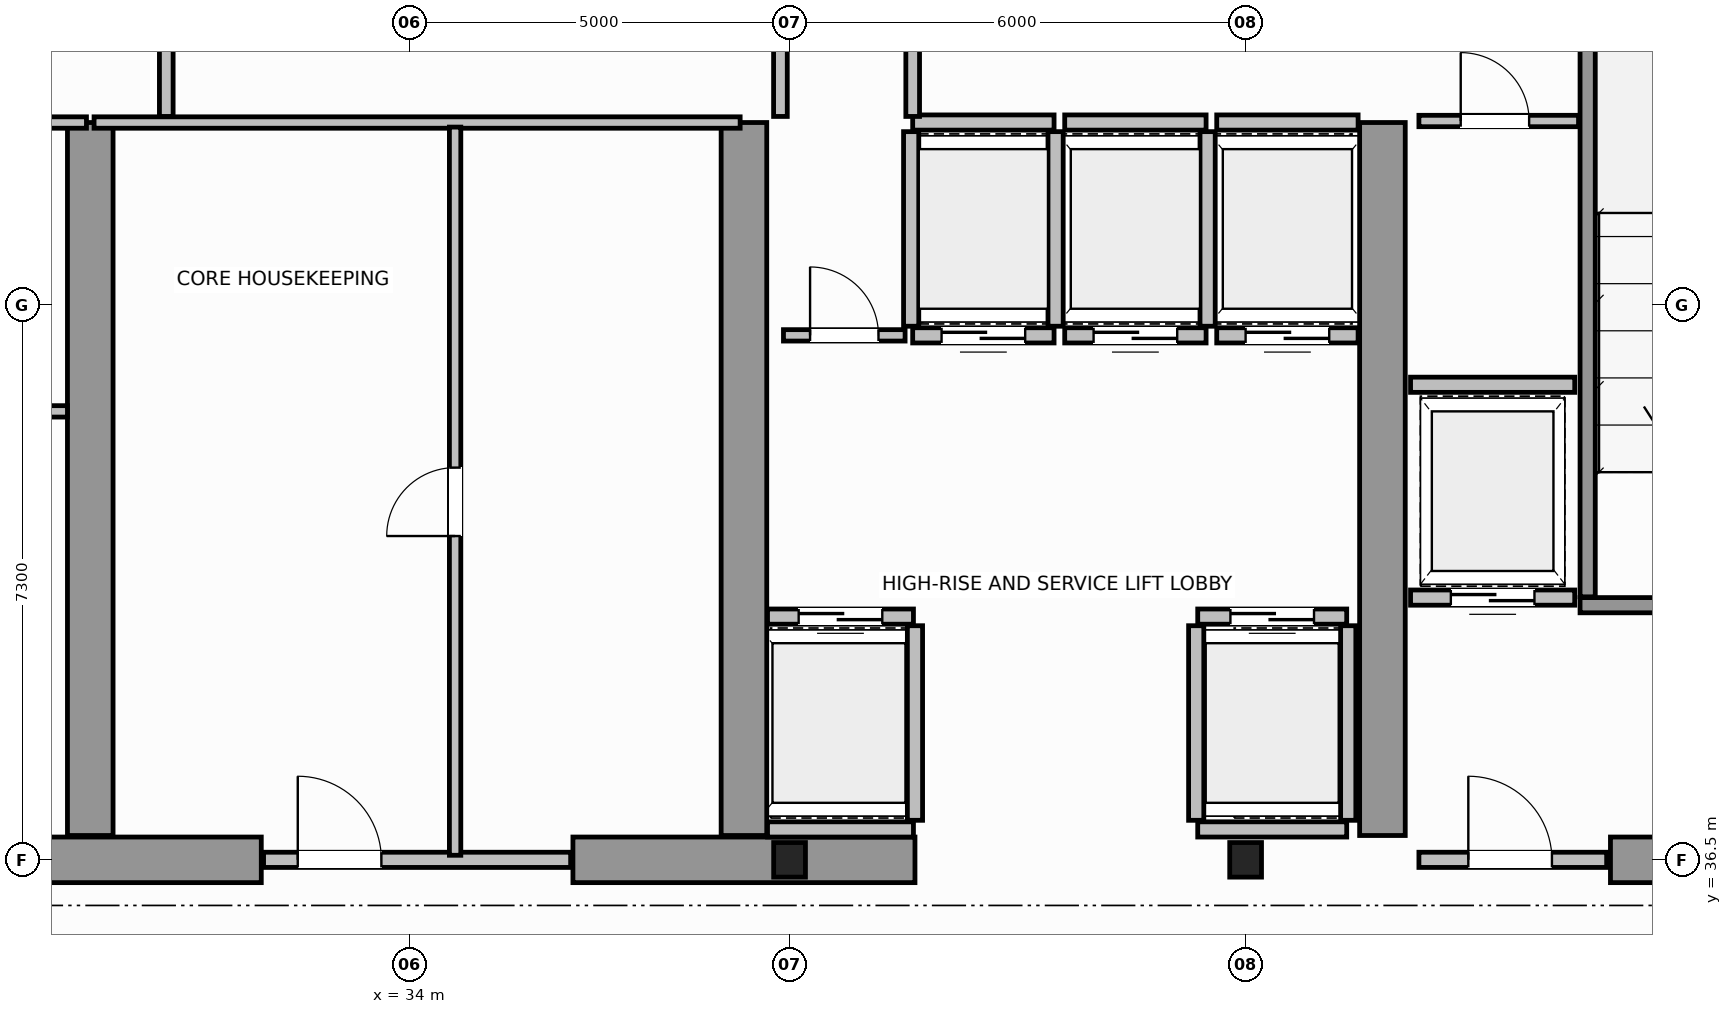
"""IFC4 building model, lengths in metres.
Left out: names, types, materials, properties, quantities, classifications, styles, units other than length and angle.
Written with IfcOpenShell. Run it as: python <this file> out.ifc"""

import sys

from ifc_helpers import new_model, si_unit, direction, frame, frame_2d, origin, origin_2d, place, context, subcontext, project, spatial, rectangle, i_section, extrude, source, transform, mapped, element, fill, save


model = new_model("IFC4")
c1 = context("Model", 3, precision=1e-05, world=origin(), true_north=direction((0.0, 1.0)))
c2 = subcontext(c1, "Body", "Model", "MODEL_VIEW")
j1 = project(units=[si_unit("LENGTHUNIT", "METRE"), si_unit("PLANEANGLEUNIT", "RADIAN")], contexts=[c1])
p1 = place(None, origin())
s1 = spatial("IfcSite", under=j1, at=p1, CompositionType="ELEMENT")
p2 = place(p1, origin())
s2 = spatial("IfcBuilding", under=s1, at=p2, CompositionType="ELEMENT")
p3 = place(p2, frame((0.0, 0.0, 230.8)))
s3 = spatial("IfcBuildingStorey", under=s2, at=p3, CompositionType="ELEMENT", Elevation=230.8)
m1 = source(origin(), c2, "Body", "SweptSolid", [
    extrude(i_section(OverallWidth=0.418, OverallDepth=0.455, WebThickness=0.042, FlangeThickness=0.058, FilletRadius=0.015, at=origin_2d()), origin(), (0.0, 0.0, 1.0), 3.8),
])
for number, where, z_axis, x_axis in (
    (1, (39.0, 36.5, 0.0), (0.0, 0.0, 1.0), (1.0, 0.0, 0.0)),
    (2, (45.0, 36.5, 0.0), (0.0, 0.0, 1.0), (1.0, 0.0, 0.0)),
):
    element("IfcColumn", number, at=place(p3, frame(where, z_axis=z_axis, x_axis=x_axis)), inside=s3, PredefinedType="COLUMN", context=c2, shape_type="MappedRepresentation", body=[
        mapped(m1, transform((0.0, 0.0, 0.0), scale=1.0)),
    ])
for number, where, z_axis, x_axis in (
    (3, (27.55, 36.5, 0.0), (0.0, 0.0, 1.0), (1.0, 0.0, 0.0)),
    (4, (36.15, 36.5, 0.0), (0.0, 0.0, 1.0), (1.0, 0.0, 0.0)),
):
    element("IfcWall", number, at=place(p3, frame(where, z_axis=z_axis, x_axis=x_axis)), inside=s3, PredefinedType="SHEAR", context=c2, shape_type="SweptSolid", body=[
        extrude(rectangle(XDim=4.5, YDim=0.6, at=frame_2d((2.25, 0.0))), origin(), (0.0, 0.0, 1.0), 3.8),
    ])
p4 = place(p3, frame((49.8, 36.5, 0.0), z_axis=(0.0, 0.0, 1.0), x_axis=(1.0, 0.0, 0.0)))
e5 = element("IfcWall", 5, at=p4, inside=s3, PredefinedType="SHEAR", context=c2, shape_type="SweptSolid", body=[
    extrude(rectangle(XDim=3.88, YDim=0.6, at=frame_2d((1.94, 0.0))), origin(), (0.0, 0.0, 1.0), 2.58),
])
for number, where, z_axis, x_axis in (
    (6, (29.8, 36.82, 0.0), (0.0, 0.0, 1.0), (0.0, 1.0, 0.0)),
    (7, (38.4, 36.82, 0.0), (0.0, 0.0, 1.0), (0.0, 1.0, 0.0)),
    (8, (46.8, 36.82, 0.0), (0.0, 0.0, 1.0), (0.0, 1.0, 0.0)),
):
    element("IfcWall", number, at=place(p3, frame(where, z_axis=z_axis, x_axis=x_axis)), inside=s3, PredefinedType="SHEAR", context=c2, shape_type="SweptSolid", body=[
        extrude(rectangle(XDim=9.38, YDim=0.6, at=frame_2d((4.69, 0.0))), origin(), (0.0, 0.0, 1.0), 3.8),
    ])
p5 = place(p3, frame((49.4, 39.85, 0.0), z_axis=(0.0, 0.0, 1.0), x_axis=(1.0, 0.0, 0.0)))
e9 = element("IfcWall", 9, at=p5, inside=s3, PredefinedType="SOLIDWALL", context=c2, shape_type="SweptSolid", body=[
    extrude(rectangle(XDim=4.3, YDim=0.2, at=frame_2d((2.15, 0.0))), origin(), (0.0, 0.0, 1.0), 3.8),
])
p6 = place(p5, frame((1.325, 0.0, 0.0)))
e10 = element("IfcOpeningElement", 10, at=p6, cuts=e9, PredefinedType="OPENING", context=c2, shape_type="SweptSolid", body=[
    extrude(rectangle(XDim=1.1, YDim=2.15, at=frame_2d((0.55, 1.075))), frame((0.0, 0.11, 0.0), z_axis=(0.0, -1.0, 0.0), x_axis=(1.0, 0.0, 0.0)), (0.0, 0.0, 1.0), 0.22),
])
p7 = place(p3, frame((49.5, 39.96, 0.0), z_axis=(0.0, 0.0, 1.0), x_axis=(0.0, 1.0, 0.0)))
e11 = element("IfcWall", 11, at=p7, inside=s3, PredefinedType="SOLIDWALL", context=c2, shape_type="SweptSolid", body=[
    extrude(rectangle(XDim=9.93, YDim=0.2, at=frame_2d((4.965, 0.0))), origin(), (0.0, 0.0, 1.0), 3.8),
])
p8 = place(p3, frame((47.28, 36.5, 0.0), z_axis=(0.0, 0.0, 1.0), x_axis=(1.0, 0.0, 0.0)))
e12 = element("IfcWall", 12, at=p8, inside=s3, PredefinedType="SOLIDWALL", context=c2, shape_type="SweptSolid", body=[
    extrude(rectangle(XDim=2.47, YDim=0.2, at=frame_2d((1.235, 0.0))), origin(), (0.0, 0.0, 1.0), 2.57),
])
p9 = place(p8, frame((0.65, 0.0, 0.0)))
e13 = element("IfcOpeningElement", 13, at=p9, cuts=e12, PredefinedType="OPENING", context=c2, shape_type="SweptSolid", body=[
    extrude(rectangle(XDim=1.1, YDim=2.15, at=frame_2d((0.55, 1.075))), frame((0.0, 0.11, 0.0), z_axis=(0.0, -1.0, 0.0), x_axis=(1.0, 0.0, 0.0)), (0.0, 0.0, 1.0), 0.22),
])
p10 = place(p3, frame((38.71, 39.7, 0.0), z_axis=(0.0, 0.0, 1.0), x_axis=(1.0, 0.0, 0.0)))
e14 = element("IfcWall", 14, at=p10, inside=s3, PredefinedType="SOLIDWALL", context=c2, shape_type="SweptSolid", body=[
    extrude(rectangle(XDim=1.92, YDim=0.2, at=frame_2d((0.96, 0.0))), origin(), (0.0, 0.0, 1.0), 3.58),
])
p11 = place(p10, frame((0.41, 0.0, 0.0)))
e15 = element("IfcOpeningElement", 15, at=p11, cuts=e14, PredefinedType="OPENING", context=c2, shape_type="SweptSolid", body=[
    extrude(rectangle(XDim=1.1, YDim=2.15, at=frame_2d((0.55, 1.075))), frame((0.0, 0.11, 0.0), z_axis=(0.0, -1.0, 0.0), x_axis=(1.0, 0.0, 0.0)), (0.0, 0.0, 1.0), 0.22),
])
p12 = place(p3, frame((38.71, 36.9, 0.0), z_axis=(0.0, 0.0, 1.0), x_axis=(1.0, 0.0, 0.0)))
e16 = element("IfcWall", 16, at=p12, inside=s3, PredefinedType="SOLIDWALL", context=c2, shape_type="SweptSolid", body=[
    extrude(rectangle(XDim=1.92, YDim=0.2, at=frame_2d((0.96, 0.0))), origin(), (0.0, 0.0, 1.0), 3.58),
])
p13 = place(p3, frame((40.65, 37.02, 0.0), z_axis=(0.0, 0.0, 1.0), x_axis=(0.0, 1.0, 0.0)))
e17 = element("IfcWall", 17, at=p13, inside=s3, PredefinedType="SOLIDWALL", context=c2, shape_type="SweptSolid", body=[
    extrude(rectangle(XDim=2.56, YDim=0.2, at=frame_2d((1.28, 0.0))), origin(), (0.0, 0.0, 1.0), 3.58),
])
p14 = place(p3, frame((44.37, 39.7, 0.0), z_axis=(0.0, 0.0, 1.0), x_axis=(1.0, 0.0, 0.0)))
e18 = element("IfcWall", 18, at=p14, inside=s3, PredefinedType="SOLIDWALL", context=c2, shape_type="SweptSolid", body=[
    extrude(rectangle(XDim=1.96, YDim=0.2, at=frame_2d((0.98, 0.0))), origin(), (0.0, 0.0, 1.0), 3.58),
])
p15 = place(p14, frame((0.43, 0.0, 0.0)))
e19 = element("IfcOpeningElement", 19, at=p15, cuts=e18, PredefinedType="OPENING", context=c2, shape_type="SweptSolid", body=[
    extrude(rectangle(XDim=1.1, YDim=2.15, at=frame_2d((0.55, 1.075))), frame((0.0, 0.11, 0.0), z_axis=(0.0, -1.0, 0.0), x_axis=(1.0, 0.0, 0.0)), (0.0, 0.0, 1.0), 0.22),
])
p16 = place(p3, frame((44.37, 36.9, 0.0), z_axis=(0.0, 0.0, 1.0), x_axis=(1.0, 0.0, 0.0)))
e20 = element("IfcWall", 20, at=p16, inside=s3, PredefinedType="SOLIDWALL", context=c2, shape_type="SweptSolid", body=[
    extrude(rectangle(XDim=1.96, YDim=0.2, at=frame_2d((0.98, 0.0))), origin(), (0.0, 0.0, 1.0), 2.57),
])
for number, where, z_axis, x_axis in (
    (21, (44.35, 37.02, 0.0), (0.0, 0.0, 1.0), (0.0, 1.0, 0.0)),
    (22, (46.35, 37.02, 0.0), (0.0, 0.0, 1.0), (0.0, 1.0, 0.0)),
):
    element("IfcWall", number, at=place(p3, frame(where, z_axis=z_axis, x_axis=x_axis)), inside=s3, PredefinedType="SOLIDWALL", context=c2, shape_type="SweptSolid", body=[
        extrude(rectangle(XDim=2.56, YDim=0.2, at=frame_2d((1.28, 0.0))), origin(), (0.0, 0.0, 1.0), 3.58),
    ])
p17 = place(p3, frame((40.62, 43.4, 0.0), z_axis=(0.0, 0.0, 1.0), x_axis=(1.0, 0.0, 0.0)))
e23 = element("IfcWall", 23, at=p17, inside=s3, PredefinedType="SOLIDWALL", context=c2, shape_type="SweptSolid", body=[
    extrude(rectangle(XDim=1.86, YDim=0.2, at=frame_2d((0.93, 0.0))), origin(), (0.0, 0.0, 1.0), 3.58),
])
p18 = place(p17, frame((0.38, 0.0, 0.0)))
e24 = element("IfcOpeningElement", 24, at=p18, cuts=e23, PredefinedType="OPENING", context=c2, shape_type="SweptSolid", body=[
    extrude(rectangle(XDim=1.1, YDim=2.15, at=frame_2d((0.55, 1.075))), frame((0.0, 0.11, 0.0), z_axis=(0.0, -1.0, 0.0), x_axis=(1.0, 0.0, 0.0)), (0.0, 0.0, 1.0), 0.22),
])
p19 = place(p3, frame((40.62, 46.2, 0.0), z_axis=(0.0, 0.0, 1.0), x_axis=(1.0, 0.0, 0.0)))
e25 = element("IfcWall", 25, at=p19, inside=s3, PredefinedType="SOLIDWALL", context=c2, shape_type="SweptSolid", body=[
    extrude(rectangle(XDim=1.86, YDim=0.2, at=frame_2d((0.93, 0.0))), origin(), (0.0, 0.0, 1.0), 3.58),
])
for number, where, z_axis, x_axis in (
    (26, (40.6, 43.52, 0.0), (0.0, 0.0, 1.0), (0.0, 1.0, 0.0)),
    (27, (42.5, 43.52, 0.0), (0.0, 0.0, 1.0), (0.0, 1.0, 0.0)),
):
    element("IfcWall", number, at=place(p3, frame(where, z_axis=z_axis, x_axis=x_axis)), inside=s3, PredefinedType="SOLIDWALL", context=c2, shape_type="SweptSolid", body=[
        extrude(rectangle(XDim=2.56, YDim=0.2, at=frame_2d((1.28, 0.0))), origin(), (0.0, 0.0, 1.0), 3.58),
    ])
p20 = place(p3, frame((42.62, 43.4, 0.0), z_axis=(0.0, 0.0, 1.0), x_axis=(1.0, 0.0, 0.0)))
e28 = element("IfcWall", 28, at=p20, inside=s3, PredefinedType="SOLIDWALL", context=c2, shape_type="SweptSolid", body=[
    extrude(rectangle(XDim=1.86, YDim=0.2, at=frame_2d((0.93, 0.0))), origin(), (0.0, 0.0, 1.0), 3.58),
])
p21 = place(p20, frame((0.38, 0.0, 0.0)))
e29 = element("IfcOpeningElement", 29, at=p21, cuts=e28, PredefinedType="OPENING", context=c2, shape_type="SweptSolid", body=[
    extrude(rectangle(XDim=1.1, YDim=2.15, at=frame_2d((0.55, 1.075))), frame((0.0, 0.11, 0.0), z_axis=(0.0, -1.0, 0.0), x_axis=(1.0, 0.0, 0.0)), (0.0, 0.0, 1.0), 0.22),
])
p22 = place(p3, frame((42.62, 46.2, 0.0), z_axis=(0.0, 0.0, 1.0), x_axis=(1.0, 0.0, 0.0)))
e30 = element("IfcWall", 30, at=p22, inside=s3, PredefinedType="SOLIDWALL", context=c2, shape_type="SweptSolid", body=[
    extrude(rectangle(XDim=1.86, YDim=0.2, at=frame_2d((0.93, 0.0))), origin(), (0.0, 0.0, 1.0), 3.58),
])
p23 = place(p3, frame((44.5, 43.52, 0.0), z_axis=(0.0, 0.0, 1.0), x_axis=(0.0, 1.0, 0.0)))
e31 = element("IfcWall", 31, at=p23, inside=s3, PredefinedType="SOLIDWALL", context=c2, shape_type="SweptSolid", body=[
    extrude(rectangle(XDim=2.56, YDim=0.2, at=frame_2d((1.28, 0.0))), origin(), (0.0, 0.0, 1.0), 3.58),
])
p24 = place(p3, frame((44.62, 43.4, 0.0), z_axis=(0.0, 0.0, 1.0), x_axis=(1.0, 0.0, 0.0)))
e32 = element("IfcWall", 32, at=p24, inside=s3, PredefinedType="SOLIDWALL", context=c2, shape_type="SweptSolid", body=[
    extrude(rectangle(XDim=1.86, YDim=0.2, at=frame_2d((0.93, 0.0))), origin(), (0.0, 0.0, 1.0), 3.58),
])
p25 = place(p24, frame((0.38, 0.0, 0.0)))
e33 = element("IfcOpeningElement", 33, at=p25, cuts=e32, PredefinedType="OPENING", context=c2, shape_type="SweptSolid", body=[
    extrude(rectangle(XDim=1.1, YDim=2.15, at=frame_2d((0.55, 1.075))), frame((0.0, 0.11, 0.0), z_axis=(0.0, -1.0, 0.0), x_axis=(1.0, 0.0, 0.0)), (0.0, 0.0, 1.0), 0.22),
])
p26 = place(p3, frame((44.62, 46.2, 0.0), z_axis=(0.0, 0.0, 1.0), x_axis=(1.0, 0.0, 0.0)))
e34 = element("IfcWall", 34, at=p26, inside=s3, PredefinedType="SOLIDWALL", context=c2, shape_type="SweptSolid", body=[
    extrude(rectangle(XDim=1.86, YDim=0.2, at=frame_2d((0.93, 0.0))), origin(), (0.0, 0.0, 1.0), 3.58),
])
p27 = place(p3, frame((47.17, 39.95, 0.0), z_axis=(0.0, 0.0, 1.0), x_axis=(1.0, 0.0, 0.0)))
e35 = element("IfcWall", 35, at=p27, inside=s3, PredefinedType="SOLIDWALL", context=c2, shape_type="SweptSolid", body=[
    extrude(rectangle(XDim=2.16, YDim=0.2, at=frame_2d((1.08, 0.0))), origin(), (0.0, 0.0, 1.0), 3.58),
])
p28 = place(p27, frame((0.53, 0.0, 0.0)))
e36 = element("IfcOpeningElement", 36, at=p28, cuts=e35, PredefinedType="OPENING", context=c2, shape_type="SweptSolid", body=[
    extrude(rectangle(XDim=1.1, YDim=2.15, at=frame_2d((0.55, 1.075))), frame((0.0, 0.11, 0.0), z_axis=(0.0, -1.0, 0.0), x_axis=(1.0, 0.0, 0.0)), (0.0, 0.0, 1.0), 0.22),
])
p29 = place(p3, frame((47.17, 42.75, 0.0), z_axis=(0.0, 0.0, 1.0), x_axis=(1.0, 0.0, 0.0)))
e37 = element("IfcWall", 37, at=p29, inside=s3, PredefinedType="SOLIDWALL", context=c2, shape_type="SweptSolid", body=[
    extrude(rectangle(XDim=2.16, YDim=0.2, at=frame_2d((1.08, 0.0))), origin(), (0.0, 0.0, 1.0), 3.58),
])
p30 = place(p3, frame((21.25, 46.2, 0.0), z_axis=(0.0, 0.0, 1.0), x_axis=(1.0, 0.0, 0.0)))
e38 = element("IfcWall", 38, at=p30, inside=s3, PredefinedType="PARTITIONING", context=c2, shape_type="SweptSolid", body=[
    extrude(rectangle(XDim=8.5, YDim=0.15, at=frame_2d((4.25, 0.0))), origin(), (0.0, 0.0, 1.0), 3.58),
])
p31 = place(p3, frame((21.5, 42.4, 0.0), z_axis=(0.0, 0.0, 1.0), x_axis=(1.0, 0.0, 0.0)))
e39 = element("IfcWall", 39, at=p31, inside=s3, PredefinedType="PARTITIONING", context=c2, shape_type="SweptSolid", body=[
    extrude(rectangle(XDim=8.0, YDim=0.15, at=frame_2d((4.0, 0.0))), origin(), (0.0, 0.0, 1.0), 3.58),
])
p32 = place(p31, frame((3.4, 0.0, 0.0)))
e40 = element("IfcOpeningElement", 40, at=p32, cuts=e39, PredefinedType="OPENING", context=c2, shape_type="SweptSolid", body=[
    extrude(rectangle(XDim=0.9, YDim=2.1, at=frame_2d((0.45, 1.05))), frame((0.0, 0.085, 0.0), z_axis=(0.0, -1.0, 0.0), x_axis=(1.0, 0.0, 0.0)), (0.0, 0.0, 1.0), 0.17),
])
p33 = place(p3, frame((32.08, 36.5, 0.0), z_axis=(0.0, 0.0, 1.0), x_axis=(1.0, 0.0, 0.0)))
e41 = element("IfcWall", 41, at=p33, inside=s3, PredefinedType="SOLIDWALL", context=c2, shape_type="SweptSolid", body=[
    extrude(rectangle(XDim=4.04, YDim=0.2, at=frame_2d((2.02, 0.0))), origin(), (0.0, 0.0, 1.0), 3.02),
])
p34 = place(p33, frame((0.45, 0.0, 0.0)))
e42 = element("IfcOpeningElement", 42, at=p34, cuts=e41, PredefinedType="OPENING", context=c2, shape_type="SweptSolid", body=[
    extrude(rectangle(XDim=1.1, YDim=2.15, at=frame_2d((0.55, 1.075))), frame((0.0, 0.11, 0.0), z_axis=(0.0, -1.0, 0.0), x_axis=(1.0, 0.0, 0.0)), (0.0, 0.0, 1.0), 0.22),
])
p35 = place(p3, frame((29.85, 46.2, 0.0), z_axis=(0.0, 0.0, 1.0), x_axis=(1.0, 0.0, 0.0)))
e43 = element("IfcWall", 43, at=p35, inside=s3, PredefinedType="PARTITIONING", context=c2, shape_type="SweptSolid", body=[
    extrude(rectangle(XDim=8.5, YDim=0.15, at=frame_2d((4.25, 0.0))), origin(), (0.0, 0.0, 1.0), 3.58),
])
p36 = place(p3, frame((34.6, 36.56, 0.0), z_axis=(0.0, 0.0, 1.0), x_axis=(0.0, 1.0, 0.0)))
e44 = element("IfcWall", 44, at=p36, inside=s3, PredefinedType="PARTITIONING", context=c2, shape_type="SweptSolid", body=[
    extrude(rectangle(XDim=9.58, YDim=0.15, at=frame_2d((4.79, 0.0))), origin(), (0.0, 0.0, 1.0), 3.58),
])
p37 = place(p36, frame((4.2, 0.0, 0.0)))
e45 = element("IfcOpeningElement", 45, at=p37, cuts=e44, PredefinedType="OPENING", context=c2, shape_type="SweptSolid", body=[
    extrude(rectangle(XDim=0.9, YDim=2.1, at=frame_2d((0.45, 1.05))), frame((0.0, 0.085, 0.0), z_axis=(0.0, -1.0, 0.0), x_axis=(1.0, 0.0, 0.0)), (0.0, 0.0, 1.0), 0.17),
])
p38 = place(p3, frame((47.28, 46.22, 0.0), z_axis=(0.0, 0.0, 1.0), x_axis=(1.0, 0.0, 0.0)))
e46 = element("IfcWall", 46, at=p38, inside=s3, PredefinedType="PARTITIONING", context=c2, shape_type="SweptSolid", body=[
    extrude(rectangle(XDim=2.1, YDim=0.15, at=frame_2d((1.05, 0.0))), origin(), (0.0, 0.0, 1.0), 3.58),
])
p39 = place(p38, frame((0.55, 0.0, 0.0)))
e47 = element("IfcOpeningElement", 47, at=p39, cuts=e46, PredefinedType="OPENING", context=c2, shape_type="SweptSolid", body=[
    extrude(rectangle(XDim=0.9, YDim=2.1, at=frame_2d((0.45, 1.05))), frame((0.0, 0.085, 0.0), z_axis=(0.0, -1.0, 0.0), x_axis=(1.0, 0.0, 0.0)), (0.0, 0.0, 1.0), 0.17),
])
p40 = place(p3, frame((38.92, 43.4, 0.0), z_axis=(0.0, 0.0, 1.0), x_axis=(1.0, 0.0, 0.0)))
e48 = element("IfcWall", 48, at=p40, inside=s3, PredefinedType="PARTITIONING", context=c2, shape_type="SweptSolid", body=[
    extrude(rectangle(XDim=1.6, YDim=0.15, at=frame_2d((0.8, 0.0))), origin(), (0.0, 0.0, 1.0), 3.58),
])
p41 = place(p40, frame((0.35, 0.0, 0.0)))
e49 = element("IfcOpeningElement", 49, at=p41, cuts=e48, PredefinedType="OPENING", context=c2, shape_type="SweptSolid", body=[
    extrude(rectangle(XDim=0.9, YDim=2.1, at=frame_2d((0.45, 1.05))), frame((0.0, 0.085, 0.0), z_axis=(0.0, -1.0, 0.0), x_axis=(1.0, 0.0, 0.0)), (0.0, 0.0, 1.0), 0.17),
])
for number, where, z_axis, x_axis in (
    (50, (30.8, 46.28, 0.0), (0.0, 0.0, 1.0), (0.0, 1.0, 0.0)),
    (51, (38.88, 46.28, 0.0), (0.0, 0.0, 1.0), (0.0, 1.0, 0.0)),
):
    element("IfcWall", number, at=place(p3, frame(where, z_axis=z_axis, x_axis=x_axis)), inside=s3, PredefinedType="PLUMBINGWALL", context=c2, shape_type="SweptSolid", body=[
        extrude(rectangle(XDim=1.94, YDim=0.18, at=frame_2d((0.97, 0.0))), origin(), (0.0, 0.0, 1.0), 3.58),
    ])
p42 = place(p3, frame((40.62, 46.28, 0.0), z_axis=(0.0, 0.0, 1.0), x_axis=(0.0, 1.0, 0.0)))
e52 = element("IfcWall", 52, at=p42, inside=s3, PredefinedType="PLUMBINGWALL", context=c2, shape_type="SweptSolid", body=[
    extrude(rectangle(XDim=2.0, YDim=0.18, at=frame_2d((1.0, 0.0))), origin(), (0.0, 0.0, 1.0), 3.58),
])
m2 = source(origin(), c2, "Body", "SweptSolid", [
    extrude(rectangle(XDim=1.1, YDim=2.15, at=frame_2d((0.55, 1.075))), frame((0.0, 0.025, 0.0), z_axis=(0.0, -1.0, 0.0), x_axis=(1.0, 0.0, 0.0)), (0.0, 0.0, 1.0), 0.05),
])
p43 = place(p9, origin())
e53 = element("IfcDoor", 53, at=p43, inside=s3, OperationType="SINGLE_SWING_LEFT", PredefinedType="DOOR", context=c2, shape_type="MappedRepresentation", body=[
    mapped(m2, transform((0.0, 0.0, 0.0), scale=1.0)),
])
fill(e13, e53)
p44 = place(p11, origin())
e54 = element("IfcDoor", 54, at=p44, inside=s3, OperationType="DOUBLE_DOOR_SLIDING", PredefinedType="DOOR", context=c2, shape_type="MappedRepresentation", body=[
    mapped(m2, transform((0.0, 0.0, 0.0), scale=1.0)),
])
fill(e15, e54)
p45 = place(p15, origin())
e55 = element("IfcDoor", 55, at=p45, inside=s3, OperationType="DOUBLE_DOOR_SLIDING", PredefinedType="DOOR", context=c2, shape_type="MappedRepresentation", body=[
    mapped(m2, transform((0.0, 0.0, 0.0), scale=1.0)),
])
fill(e19, e55)
p46 = place(p18, origin())
e56 = element("IfcDoor", 56, at=p46, inside=s3, OperationType="DOUBLE_DOOR_SLIDING", PredefinedType="DOOR", context=c2, shape_type="MappedRepresentation", body=[
    mapped(m2, transform((0.0, 0.0, 0.0), scale=1.0)),
])
fill(e24, e56)
p47 = place(p21, origin())
e57 = element("IfcDoor", 57, at=p47, inside=s3, OperationType="DOUBLE_DOOR_SLIDING", PredefinedType="DOOR", context=c2, shape_type="MappedRepresentation", body=[
    mapped(m2, transform((0.0, 0.0, 0.0), scale=1.0)),
])
fill(e29, e57)
p48 = place(p25, origin())
e58 = element("IfcDoor", 58, at=p48, inside=s3, OperationType="DOUBLE_DOOR_SLIDING", PredefinedType="DOOR", context=c2, shape_type="MappedRepresentation", body=[
    mapped(m2, transform((0.0, 0.0, 0.0), scale=1.0)),
])
fill(e33, e58)
p49 = place(p28, origin())
e59 = element("IfcDoor", 59, at=p49, inside=s3, OperationType="DOUBLE_DOOR_SLIDING", PredefinedType="DOOR", context=c2, shape_type="MappedRepresentation", body=[
    mapped(m2, transform((0.0, 0.0, 0.0), scale=1.0)),
])
fill(e36, e59)
p50 = place(p34, origin())
e60 = element("IfcDoor", 60, at=p50, inside=s3, OperationType="SINGLE_SWING_LEFT", PredefinedType="DOOR", context=c2, shape_type="MappedRepresentation", body=[
    mapped(m2, transform((0.0, 0.0, 0.0), scale=1.0)),
])
fill(e42, e60)
m3 = source(origin(), c2, "Body", "SweptSolid", [
    extrude(rectangle(XDim=0.9, YDim=2.1, at=frame_2d((0.45, 1.05))), frame((0.0, 0.025, 0.0), z_axis=(0.0, -1.0, 0.0), x_axis=(1.0, 0.0, 0.0)), (0.0, 0.0, 1.0), 0.05),
])
p51 = place(p37, origin())
e61 = element("IfcDoor", 61, at=p51, inside=s3, OperationType="SINGLE_SWING_RIGHT", PredefinedType="DOOR", context=c2, shape_type="MappedRepresentation", body=[
    mapped(m3, transform((0.0, 0.0, 0.0), scale=1.0)),
])
fill(e45, e61)
p52 = place(p39, origin())
e62 = element("IfcDoor", 62, at=p52, inside=s3, OperationType="SINGLE_SWING_RIGHT", PredefinedType="DOOR", context=c2, shape_type="MappedRepresentation", body=[
    mapped(m3, transform((0.0, 0.0, 0.0), scale=1.0)),
])
fill(e47, e62)
p53 = place(p41, origin())
e63 = element("IfcDoor", 63, at=p53, inside=s3, OperationType="SINGLE_SWING_LEFT", PredefinedType="DOOR", context=c2, shape_type="MappedRepresentation", body=[
    mapped(m3, transform((0.0, 0.0, 0.0), scale=1.0)),
])
fill(e49, e63)
save(model, sys.argv[1])
